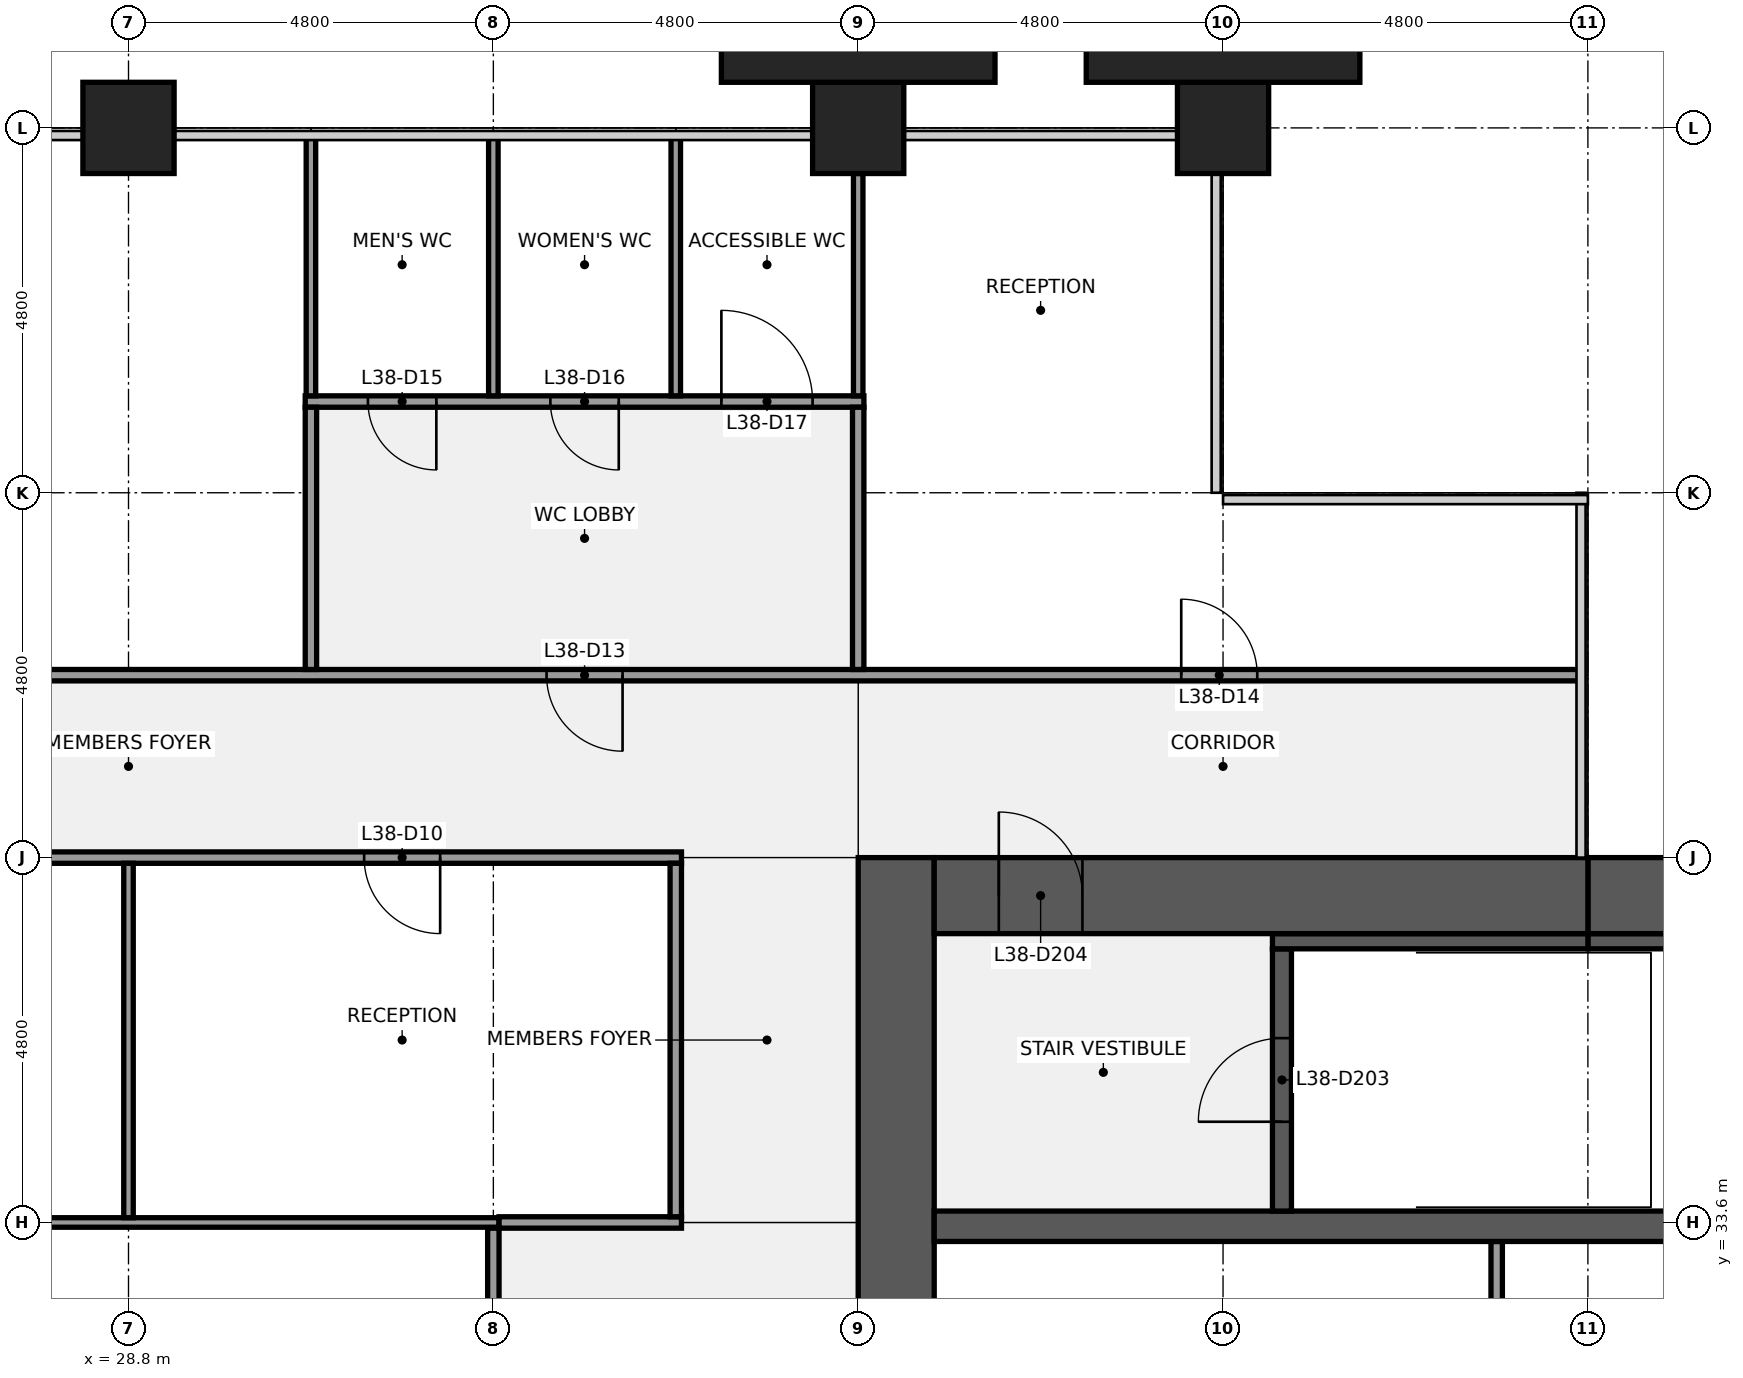
"""IFC4 building model, lengths in metres.
Left out: names, types, materials, properties, quantities, classifications, styles, units other than length and angle.
Written with IfcOpenShell. Run it as: python <this file> out.ifc"""

import sys

from ifc_helpers import new_model, si_unit, direction, frame, frame_2d, origin, origin_2d, place, context, subcontext, project, spatial, rectangle, extrude, element, fill, save


model = new_model("IFC4")
c1 = context("Model", 3, precision=1e-05, world=origin(), true_north=direction((0.0, 1.0)))
c2 = subcontext(c1, "Body", "Model", "MODEL_VIEW")
j1 = project(units=[si_unit("LENGTHUNIT", "METRE"), si_unit("PLANEANGLEUNIT", "RADIAN")], contexts=[c1])
p1 = place(None, origin())
s1 = spatial("IfcSite", under=j1, at=p1, CompositionType="ELEMENT")
p2 = place(p1, origin())
s2 = spatial("IfcBuilding", under=s1, at=p2, CompositionType="ELEMENT")
p3 = place(p2, frame((0.0, 0.0, 172.1)))
s3 = spatial("IfcBuildingStorey", under=s2, at=p3, CompositionType="ELEMENT", Elevation=172.1)
for number, where, z_axis, x_axis in (
    (1, (28.8, 48.0, 0.0), (0.0, 0.0, 1.0), (1.0, 0.0, 0.0)),
    (2, (38.4, 48.0, 0.0), (0.0, 0.0, 1.0), (1.0, 0.0, 0.0)),
    (3, (43.2, 48.0, 0.0), (0.0, 0.0, 1.0), (1.0, 0.0, 0.0)),
):
    element("IfcColumn", number, at=place(p3, frame(where, z_axis=z_axis, x_axis=x_axis)), inside=s3, PredefinedType="COLUMN", context=c2, shape_type="SweptSolid", body=[
        extrude(rectangle(XDim=1.2, YDim=1.2, at=origin_2d()), origin(), (0.0, 0.0, 1.0), 4.0),
    ])
p4 = place(p3, frame((38.9, 9.6, 0.0), z_axis=(0.0, 0.0, 1.0), x_axis=(0.0, 1.0, 0.0)))
e4 = element("IfcWall", 4, at=p4, inside=s3, PredefinedType="SHEAR", context=c2, shape_type="SweptSolid", body=[
    extrude(rectangle(XDim=28.8, YDim=1.0, at=frame_2d((14.4, 0.0))), origin(), (0.0, 0.0, 1.0), 3.7),
])
p5 = place(p4, frame((8.7, 0.0, 0.0)))
e5 = element("IfcOpeningElement", 5, at=p5, cuts=e4, PredefinedType="OPENING", context=c2, shape_type="SweptSolid", body=[
    extrude(rectangle(XDim=1.8, YDim=2.1, at=frame_2d((0.9, 1.05))), frame((0.0, 0.51, 0.0), z_axis=(0.0, -1.0, 0.0), x_axis=(1.0, 0.0, 0.0)), (0.0, 0.0, 1.0), 1.02),
])
p6 = place(p4, frame((18.3, 0.0, 0.0)))
e6 = element("IfcOpeningElement", 6, at=p6, cuts=e4, PredefinedType="OPENING", context=c2, shape_type="SweptSolid", body=[
    extrude(rectangle(XDim=1.8, YDim=2.1, at=frame_2d((0.9, 1.05))), frame((0.0, 0.51, 0.0), z_axis=(0.0, -1.0, 0.0), x_axis=(1.0, 0.0, 0.0)), (0.0, 0.0, 1.0), 1.02),
])
p7 = place(p3, frame((46.8, 30.75, 0.0), z_axis=(0.0, 0.0, 1.0), x_axis=(0.0, 1.0, 0.0)))
e7 = element("IfcWall", 7, at=p7, inside=s3, PredefinedType="PARTITIONING", context=c2, shape_type="SweptSolid", body=[
    extrude(rectangle(XDim=2.6, YDim=0.15, at=frame_2d((1.3, 0.0))), origin(), (0.0, 0.0, 1.0), 3.7),
])
p8 = place(p3, frame((39.4, 33.55, 0.0), z_axis=(0.0, 0.0, 1.0), x_axis=(1.0, 0.0, 0.0)))
e8 = element("IfcWall", 8, at=p8, inside=s3, PredefinedType="SHEAR", context=c2, shape_type="SweptSolid", body=[
    extrude(rectangle(XDim=17.2, YDim=0.4, at=frame_2d((8.6, 0.0))), origin(), (0.0, 0.0, 1.0), 3.7),
])
p9 = place(p3, frame((43.975, 33.75, 0.0), z_axis=(0.0, 0.0, 1.0), x_axis=(0.0, 1.0, 0.0)))
e9 = element("IfcWall", 9, at=p9, inside=s3, PredefinedType="SHEAR", context=c2, shape_type="SweptSolid", body=[
    extrude(rectangle(XDim=3.45, YDim=0.25, at=frame_2d((1.725, 0.0))), origin(), (0.0, 0.0, 1.0), 3.7),
])
p10 = place(p9, frame((1.175, 0.0, 0.0)))
e10 = element("IfcOpeningElement", 10, at=p10, cuts=e9, PredefinedType="OPENING", context=c2, shape_type="SweptSolid", body=[
    extrude(rectangle(XDim=1.1, YDim=2.1, at=frame_2d((0.55, 1.05))), frame((0.0, 0.135, 0.0), z_axis=(0.0, -1.0, 0.0), x_axis=(1.0, 0.0, 0.0)), (0.0, 0.0, 1.0), 0.27),
])
p11 = place(p3, frame((48.0, 37.3, 0.0), z_axis=(0.0, 0.0, 1.0), x_axis=(1.0, 0.0, 0.0)))
e11 = element("IfcWall", 11, at=p11, inside=s3, PredefinedType="SHEAR", context=c2, shape_type="SweptSolid", body=[
    extrude(rectangle(XDim=3.35, YDim=0.2, at=frame_2d((1.675, 0.0))), origin(), (0.0, 0.0, 1.0), 3.7),
])
p12 = place(p3, frame((43.85, 37.3, 0.0), z_axis=(0.0, 0.0, 1.0), x_axis=(1.0, 0.0, 0.0)))
e12 = element("IfcWall", 12, at=p12, inside=s3, PredefinedType="SHEAR", context=c2, shape_type="SweptSolid", body=[
    extrude(rectangle(XDim=4.15, YDim=0.2, at=frame_2d((2.075, 0.0))), origin(), (0.0, 0.0, 1.0), 3.7),
])
p13 = place(p3, frame((48.0, 37.9, 0.0), z_axis=(0.0, 0.0, 1.0), x_axis=(1.0, 0.0, 0.0)))
e13 = element("IfcWall", 13, at=p13, inside=s3, PredefinedType="SHEAR", context=c2, shape_type="SweptSolid", body=[
    extrude(rectangle(XDim=8.6, YDim=1.0, at=frame_2d((4.3, 0.0))), origin(), (0.0, 0.0, 1.0), 3.7),
])
p14 = place(p13, frame((1.5, 0.0, 0.9)))
e14 = element("IfcOpeningElement", 14, at=p14, cuts=e13, PredefinedType="OPENING", context=c2, shape_type="SweptSolid", body=[
    extrude(rectangle(XDim=1.8, YDim=1.5, at=frame_2d((0.9, 0.75))), frame((0.0, 0.51, 0.0), z_axis=(0.0, -1.0, 0.0), x_axis=(1.0, 0.0, 0.0)), (0.0, 0.0, 1.0), 1.02),
])
p15 = place(p3, frame((39.4, 37.9, 0.0), z_axis=(0.0, 0.0, 1.0), x_axis=(1.0, 0.0, 0.0)))
e15 = element("IfcWall", 15, at=p15, inside=s3, PredefinedType="SHEAR", context=c2, shape_type="SweptSolid", body=[
    extrude(rectangle(XDim=8.6, YDim=1.0, at=frame_2d((4.3, 0.0))), origin(), (0.0, 0.0, 1.0), 3.7),
])
p16 = place(p15, frame((0.85, 0.0, 0.0)))
e16 = element("IfcOpeningElement", 16, at=p16, cuts=e15, PredefinedType="OPENING", context=c2, shape_type="SweptSolid", body=[
    extrude(rectangle(XDim=1.1, YDim=2.1, at=frame_2d((0.55, 1.05))), frame((0.0, 0.51, 0.0), z_axis=(0.0, -1.0, 0.0), x_axis=(1.0, 0.0, 0.0)), (0.0, 0.0, 1.0), 1.02),
])
p17 = place(p3, frame((24.075, 33.6, 0.0), z_axis=(0.0, 0.0, 1.0), x_axis=(1.0, 0.0, 0.0)))
e17 = element("IfcWall", 17, at=p17, inside=s3, PredefinedType="PARTITIONING", context=c2, shape_type="SweptSolid", body=[
    extrude(rectangle(XDim=9.6, YDim=0.125, at=frame_2d((4.8, 0.0))), origin(), (0.0, 0.0, 1.0), 2.709),
])
p18 = place(p3, frame((33.675, 33.6, 0.0), z_axis=(0.0, 0.0, 1.0), x_axis=(1.0, 0.0, 0.0)))
e18 = element("IfcWall", 18, at=p18, inside=s3, PredefinedType="PARTITIONING", context=c2, shape_type="SweptSolid", body=[
    extrude(rectangle(XDim=2.4, YDim=0.15, at=frame_2d((1.2, 0.0))), origin(), (0.0, 0.0, 1.0), 2.709),
])
p19 = place(p3, frame((21.525, 38.4, 0.0), z_axis=(0.0, 0.0, 1.0), x_axis=(1.0, 0.0, 0.0)))
e19 = element("IfcWall", 19, at=p19, inside=s3, PredefinedType="PARTITIONING", context=c2, shape_type="SweptSolid", body=[
    extrude(rectangle(XDim=14.55, YDim=0.15, at=frame_2d((7.275, 0.0))), origin(), (0.0, 0.0, 1.0), 2.709),
])
p20 = place(p19, frame((3.175, 0.0, 0.0)))
e20 = element("IfcOpeningElement", 20, at=p20, cuts=e19, PredefinedType="OPENING", context=c2, shape_type="SweptSolid", body=[
    extrude(rectangle(XDim=1.0, YDim=2.1, at=frame_2d((0.5, 1.05))), frame((0.0, 0.085, 0.0), z_axis=(0.0, -1.0, 0.0), x_axis=(1.0, 0.0, 0.0)), (0.0, 0.0, 1.0), 0.17),
])
p21 = place(p19, frame((10.375, 0.0, 0.0)))
e21 = element("IfcOpeningElement", 21, at=p21, cuts=e19, PredefinedType="OPENING", context=c2, shape_type="SweptSolid", body=[
    extrude(rectangle(XDim=1.0, YDim=2.1, at=frame_2d((0.5, 1.05))), frame((0.0, 0.085, 0.0), z_axis=(0.0, -1.0, 0.0), x_axis=(1.0, 0.0, 0.0)), (0.0, 0.0, 1.0), 0.17),
])
p22 = place(p3, frame((9.7, 40.8, 0.0), z_axis=(0.0, 0.0, 1.0), x_axis=(1.0, 0.0, 0.0)))
e22 = element("IfcWall", 22, at=p22, inside=s3, PredefinedType="PARTITIONING", context=c2, shape_type="SweptSolid", body=[
    extrude(rectangle(XDim=38.2, YDim=0.15, at=frame_2d((19.1, 0.0))), origin(), (0.0, 0.0, 1.0), 2.709),
])
p23 = place(p22, frame((4.25, 0.0, 0.0)))
e23 = element("IfcOpeningElement", 23, at=p23, cuts=e22, PredefinedType="OPENING", context=c2, shape_type="SweptSolid", body=[
    extrude(rectangle(XDim=1.0, YDim=2.1, at=frame_2d((0.5, 1.05))), frame((0.0, 0.085, 0.0), z_axis=(0.0, -1.0, 0.0), x_axis=(1.0, 0.0, 0.0)), (0.0, 0.0, 1.0), 0.17),
])
p24 = place(p22, frame((15.0, 0.0, 0.0)))
e24 = element("IfcOpeningElement", 24, at=p24, cuts=e22, PredefinedType="OPENING", context=c2, shape_type="SweptSolid", body=[
    extrude(rectangle(XDim=1.0, YDim=2.1, at=frame_2d((0.5, 1.05))), frame((0.0, 0.085, 0.0), z_axis=(0.0, -1.0, 0.0), x_axis=(1.0, 0.0, 0.0)), (0.0, 0.0, 1.0), 0.17),
])
p25 = place(p22, frame((24.6, 0.0, 0.0)))
e25 = element("IfcOpeningElement", 25, at=p25, cuts=e22, PredefinedType="OPENING", context=c2, shape_type="SweptSolid", body=[
    extrude(rectangle(XDim=1.0, YDim=2.1, at=frame_2d((0.5, 1.05))), frame((0.0, 0.085, 0.0), z_axis=(0.0, -1.0, 0.0), x_axis=(1.0, 0.0, 0.0)), (0.0, 0.0, 1.0), 0.17),
])
p26 = place(p22, frame((32.95, 0.0, 0.0)))
e26 = element("IfcOpeningElement", 26, at=p26, cuts=e22, PredefinedType="OPENING", context=c2, shape_type="SweptSolid", body=[
    extrude(rectangle(XDim=1.0, YDim=2.1, at=frame_2d((0.5, 1.05))), frame((0.0, 0.085, 0.0), z_axis=(0.0, -1.0, 0.0), x_axis=(1.0, 0.0, 0.0)), (0.0, 0.0, 1.0), 0.17),
])
p27 = place(p3, frame((31.125, 44.4, 0.0), z_axis=(0.0, 0.0, 1.0), x_axis=(1.0, 0.0, 0.0)))
e27 = element("IfcWall", 27, at=p27, inside=s3, PredefinedType="PARTITIONING", context=c2, shape_type="SweptSolid", body=[
    extrude(rectangle(XDim=7.35, YDim=0.15, at=frame_2d((3.675, 0.0))), origin(), (0.0, 0.0, 1.0), 2.709),
])
p28 = place(p27, frame((0.825, 0.0, 0.0)))
e28 = element("IfcOpeningElement", 28, at=p28, cuts=e27, PredefinedType="OPENING", context=c2, shape_type="SweptSolid", body=[
    extrude(rectangle(XDim=0.9, YDim=2.1, at=frame_2d((0.45, 1.05))), frame((0.0, 0.085, 0.0), z_axis=(0.0, -1.0, 0.0), x_axis=(1.0, 0.0, 0.0)), (0.0, 0.0, 1.0), 0.17),
])
p29 = place(p27, frame((3.225, 0.0, 0.0)))
e29 = element("IfcOpeningElement", 29, at=p29, cuts=e27, PredefinedType="OPENING", context=c2, shape_type="SweptSolid", body=[
    extrude(rectangle(XDim=0.9, YDim=2.1, at=frame_2d((0.45, 1.05))), frame((0.0, 0.085, 0.0), z_axis=(0.0, -1.0, 0.0), x_axis=(1.0, 0.0, 0.0)), (0.0, 0.0, 1.0), 0.17),
])
p30 = place(p27, frame((5.475, 0.0, 0.0)))
e30 = element("IfcOpeningElement", 30, at=p30, cuts=e27, PredefinedType="OPENING", context=c2, shape_type="SweptSolid", body=[
    extrude(rectangle(XDim=1.2, YDim=2.1, at=frame_2d((0.6, 1.05))), frame((0.0, 0.085, 0.0), z_axis=(0.0, -1.0, 0.0), x_axis=(1.0, 0.0, 0.0)), (0.0, 0.0, 1.0), 0.17),
])
p31 = place(p3, frame((28.8, 33.663, 0.0), z_axis=(0.0, 0.0, 1.0), x_axis=(0.0, 1.0, 0.0)))
e31 = element("IfcWall", 31, at=p31, inside=s3, PredefinedType="PARTITIONING", context=c2, shape_type="SweptSolid", body=[
    extrude(rectangle(XDim=4.662, YDim=0.125, at=frame_2d((2.331, 0.0))), origin(), (0.0, 0.0, 1.0), 2.709),
])
p32 = place(p3, frame((31.2, 44.475, 0.0), z_axis=(0.0, 0.0, 1.0), x_axis=(0.0, 1.0, 0.0)))
e32 = element("IfcWall", 32, at=p32, inside=s3, PredefinedType="PARTITIONING", context=c2, shape_type="SweptSolid", body=[
    extrude(rectangle(XDim=3.425, YDim=0.125, at=frame_2d((1.712, 0.0))), origin(), (0.0, 0.0, 1.0), 2.709),
])
p33 = place(p3, frame((31.2, 40.875, 0.0), z_axis=(0.0, 0.0, 1.0), x_axis=(0.0, 1.0, 0.0)))
e33 = element("IfcWall", 33, at=p33, inside=s3, PredefinedType="PARTITIONING", context=c2, shape_type="SweptSolid", body=[
    extrude(rectangle(XDim=3.45, YDim=0.15, at=frame_2d((1.725, 0.0))), origin(), (0.0, 0.0, 1.0), 2.709),
])
p34 = place(p3, frame((33.6, 44.475, 0.0), z_axis=(0.0, 0.0, 1.0), x_axis=(0.0, 1.0, 0.0)))
e34 = element("IfcWall", 34, at=p34, inside=s3, PredefinedType="PARTITIONING", context=c2, shape_type="SweptSolid", body=[
    extrude(rectangle(XDim=3.425, YDim=0.125, at=frame_2d((1.712, 0.0))), origin(), (0.0, 0.0, 1.0), 2.709),
])
p35 = place(p3, frame((33.6, 30.075, 0.0), z_axis=(0.0, 0.0, 1.0), x_axis=(0.0, 1.0, 0.0)))
e35 = element("IfcWall", 35, at=p35, inside=s3, PredefinedType="PARTITIONING", context=c2, shape_type="SweptSolid", body=[
    extrude(rectangle(XDim=3.45, YDim=0.15, at=frame_2d((1.725, 0.0))), origin(), (0.0, 0.0, 1.0), 2.709),
])
p36 = place(p3, frame((36.0, 44.475, 0.0), z_axis=(0.0, 0.0, 1.0), x_axis=(0.0, 1.0, 0.0)))
e36 = element("IfcWall", 36, at=p36, inside=s3, PredefinedType="PARTITIONING", context=c2, shape_type="SweptSolid", body=[
    extrude(rectangle(XDim=3.425, YDim=0.125, at=frame_2d((1.712, 0.0))), origin(), (0.0, 0.0, 1.0), 2.709),
])
p37 = place(p3, frame((36.0, 33.675, 0.0), z_axis=(0.0, 0.0, 1.0), x_axis=(0.0, 1.0, 0.0)))
e37 = element("IfcWall", 37, at=p37, inside=s3, PredefinedType="PARTITIONING", context=c2, shape_type="SweptSolid", body=[
    extrude(rectangle(XDim=4.65, YDim=0.15, at=frame_2d((2.325, 0.0))), origin(), (0.0, 0.0, 1.0), 2.709),
])
p38 = place(p3, frame((38.4, 44.475, 0.0), z_axis=(0.0, 0.0, 1.0), x_axis=(0.0, 1.0, 0.0)))
e38 = element("IfcWall", 38, at=p38, inside=s3, PredefinedType="PARTITIONING", context=c2, shape_type="SweptSolid", body=[
    extrude(rectangle(XDim=2.925, YDim=0.125, at=frame_2d((1.462, 0.0))), origin(), (0.0, 0.0, 1.0), 2.709),
])
p39 = place(p3, frame((38.4, 40.875, 0.0), z_axis=(0.0, 0.0, 1.0), x_axis=(0.0, 1.0, 0.0)))
e39 = element("IfcWall", 39, at=p39, inside=s3, PredefinedType="PARTITIONING", context=c2, shape_type="SweptSolid", body=[
    extrude(rectangle(XDim=3.45, YDim=0.15, at=frame_2d((1.725, 0.0))), origin(), (0.0, 0.0, 1.0), 2.709),
])
for number, where, z_axis, x_axis in (
    (40, (38.4, 49.05, 0.0), (0.0, 0.0, 1.0), (1.0, 0.0, 0.0)),
    (41, (43.2, 49.05, 0.0), (0.0, 0.0, 1.0), (1.0, 0.0, 0.0)),
):
    element("IfcColumn", number, at=place(p3, frame(where, z_axis=z_axis, x_axis=x_axis)), inside=s3, PredefinedType="PILASTER", context=c2, shape_type="SweptSolid", body=[
        extrude(rectangle(XDim=3.6, YDim=0.9, at=origin_2d()), origin(), (0.0, 0.0, 1.0), 4.0),
    ])
p40 = place(p10, origin())
e42 = element("IfcDoor", 42, at=p40, inside=s3, OperationType="SINGLE_SWING_LEFT", PredefinedType="DOOR", context=c2, shape_type="SweptSolid", body=[
    extrude(rectangle(XDim=1.1, YDim=2.1, at=frame_2d((0.55, 1.05))), frame((0.0, 0.025, 0.0), z_axis=(0.0, -1.0, 0.0), x_axis=(1.0, 0.0, 0.0)), (0.0, 0.0, 1.0), 0.05),
])
fill(e10, e42)
p41 = place(p16, origin())
e43 = element("IfcDoor", 43, at=p41, inside=s3, OperationType="SINGLE_SWING_LEFT", PredefinedType="DOOR", context=c2, shape_type="SweptSolid", body=[
    extrude(rectangle(XDim=1.1, YDim=2.1, at=frame_2d((0.55, 1.05))), frame((0.0, 0.025, 0.0), z_axis=(0.0, -1.0, 0.0), x_axis=(1.0, 0.0, 0.0)), (0.0, 0.0, 1.0), 0.05),
])
fill(e16, e43)
p42 = place(p21, origin())
e44 = element("IfcDoor", 44, at=p42, inside=s3, OperationType="SINGLE_SWING_RIGHT", PredefinedType="DOOR", context=c2, shape_type="SweptSolid", body=[
    extrude(rectangle(XDim=1.0, YDim=2.1, at=frame_2d((0.5, 1.05))), frame((0.0, 0.025, 0.0), z_axis=(0.0, -1.0, 0.0), x_axis=(1.0, 0.0, 0.0)), (0.0, 0.0, 1.0), 0.05),
])
fill(e21, e44)
p43 = place(p25, origin())
e45 = element("IfcDoor", 45, at=p43, inside=s3, OperationType="SINGLE_SWING_RIGHT", PredefinedType="DOOR", context=c2, shape_type="SweptSolid", body=[
    extrude(rectangle(XDim=1.0, YDim=2.1, at=frame_2d((0.5, 1.05))), frame((0.0, 0.025, 0.0), z_axis=(0.0, -1.0, 0.0), x_axis=(1.0, 0.0, 0.0)), (0.0, 0.0, 1.0), 0.05),
])
fill(e25, e45)
p44 = place(p26, origin())
e46 = element("IfcDoor", 46, at=p44, inside=s3, OperationType="SINGLE_SWING_LEFT", PredefinedType="DOOR", context=c2, shape_type="SweptSolid", body=[
    extrude(rectangle(XDim=1.0, YDim=2.1, at=frame_2d((0.5, 1.05))), frame((0.0, 0.025, 0.0), z_axis=(0.0, -1.0, 0.0), x_axis=(1.0, 0.0, 0.0)), (0.0, 0.0, 1.0), 0.05),
])
fill(e26, e46)
p45 = place(p28, origin())
e47 = element("IfcDoor", 47, at=p45, inside=s3, OperationType="SINGLE_SWING_RIGHT", PredefinedType="DOOR", context=c2, shape_type="SweptSolid", body=[
    extrude(rectangle(XDim=0.9, YDim=2.1, at=frame_2d((0.45, 1.05))), frame((0.0, 0.025, 0.0), z_axis=(0.0, -1.0, 0.0), x_axis=(1.0, 0.0, 0.0)), (0.0, 0.0, 1.0), 0.05),
])
fill(e28, e47)
p46 = place(p29, origin())
e48 = element("IfcDoor", 48, at=p46, inside=s3, OperationType="SINGLE_SWING_RIGHT", PredefinedType="DOOR", context=c2, shape_type="SweptSolid", body=[
    extrude(rectangle(XDim=0.9, YDim=2.1, at=frame_2d((0.45, 1.05))), frame((0.0, 0.025, 0.0), z_axis=(0.0, -1.0, 0.0), x_axis=(1.0, 0.0, 0.0)), (0.0, 0.0, 1.0), 0.05),
])
fill(e29, e48)
p47 = place(p30, origin())
e49 = element("IfcDoor", 49, at=p47, inside=s3, OperationType="SINGLE_SWING_LEFT", PredefinedType="DOOR", context=c2, shape_type="SweptSolid", body=[
    extrude(rectangle(XDim=1.2, YDim=2.1, at=frame_2d((0.6, 1.05))), frame((0.0, 0.025, 0.0), z_axis=(0.0, -1.0, 0.0), x_axis=(1.0, 0.0, 0.0)), (0.0, 0.0, 1.0), 0.05),
])
fill(e30, e49)
save(model, sys.argv[1])
